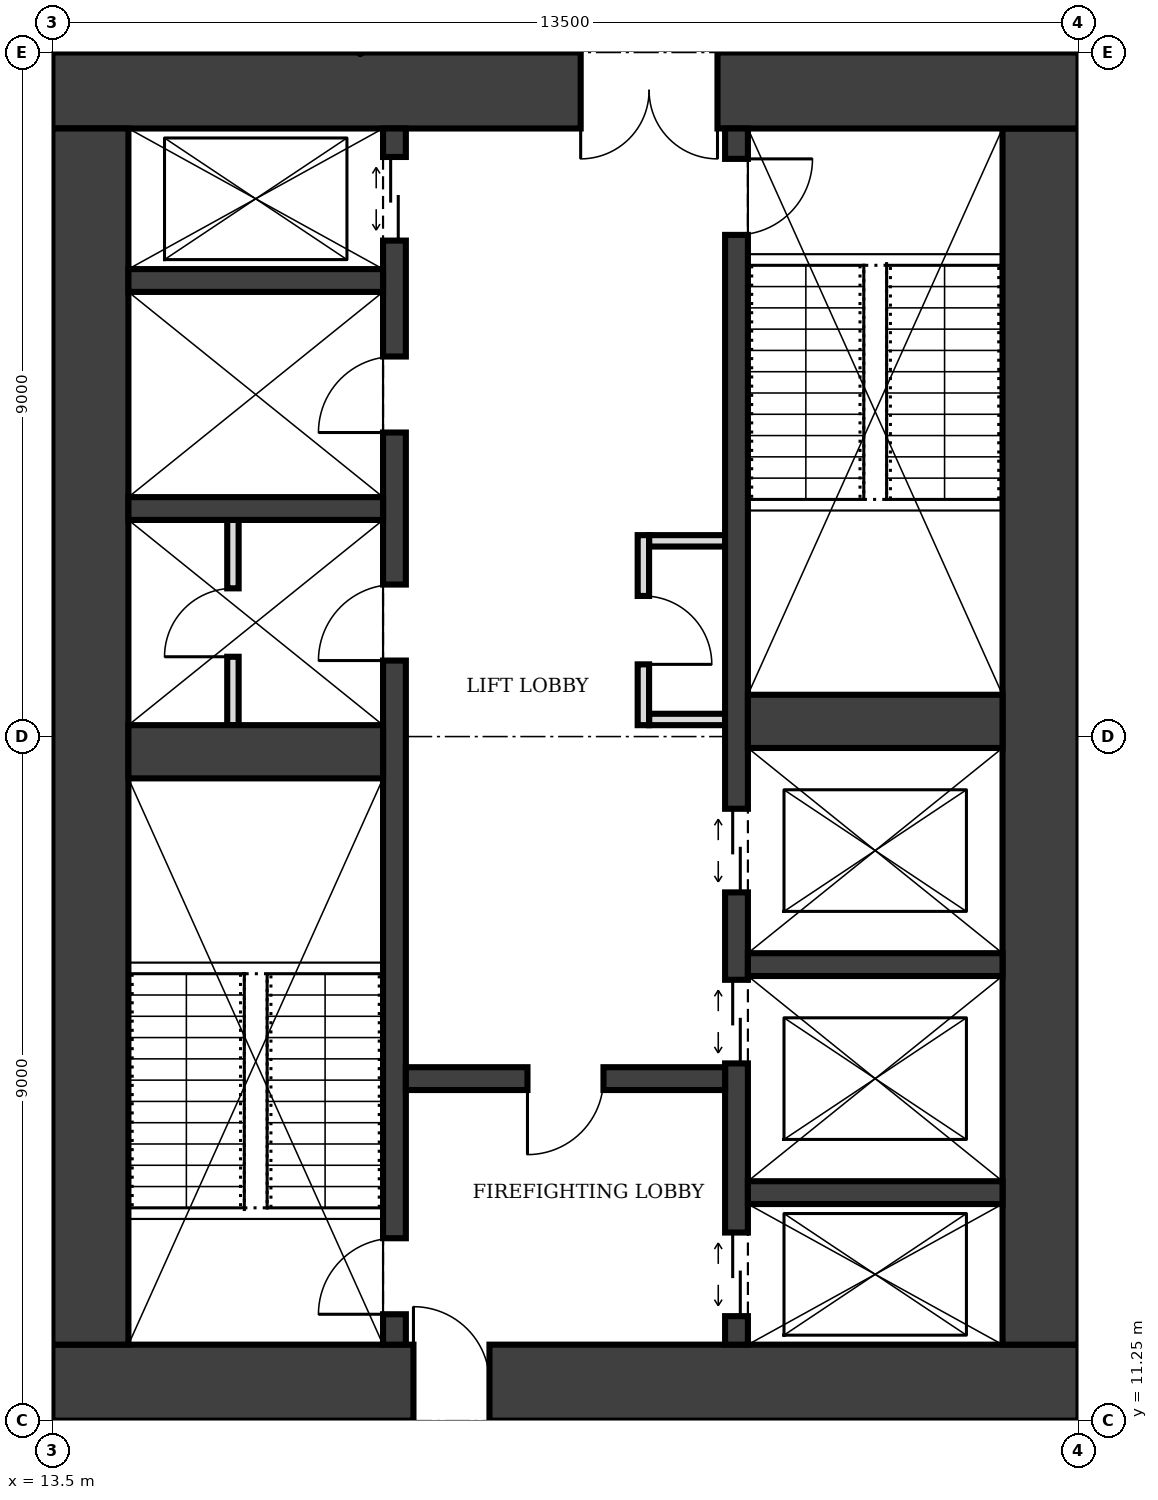
"""IFC4 building model, lengths in metres.
Left out: names, types, materials, properties, quantities, classifications, styles, units other than length and angle.
Written with IfcOpenShell. Run it as: python <this file> out.ifc"""

import sys

from ifc_helpers import new_model, si_unit, direction, frame, frame_2d, origin, place, context, subcontext, project, spatial, rectangle, extrude, element, fill, save


model = new_model("IFC4")
c1 = context("Model", 3, precision=1e-05, world=origin(), true_north=direction((0.0, 1.0)))
c2 = subcontext(c1, "Body", "Model", "MODEL_VIEW")
j1 = project(units=[si_unit("LENGTHUNIT", "METRE"), si_unit("PLANEANGLEUNIT", "RADIAN")], contexts=[c1])
p1 = place(None, origin())
s1 = spatial("IfcSite", under=j1, at=p1, CompositionType="ELEMENT")
p2 = place(p1, origin())
s2 = spatial("IfcBuilding", under=s1, at=p2, CompositionType="ELEMENT")
p3 = place(p2, frame((0.0, 0.0, 241.0)))
s3 = spatial("IfcBuildingStorey", under=s2, at=p3, CompositionType="ELEMENT", Elevation=241.0)
p4 = place(p3, frame((13.5, 11.75, 0.0), z_axis=(0.0, 0.0, 1.0), x_axis=(1.0, 0.0, 0.0)))
e1 = element("IfcWall", 1, at=p4, inside=s3, PredefinedType="SHEAR", context=c2, shape_type="SweptSolid", body=[
    extrude(rectangle(XDim=13.5, YDim=1.0, at=frame_2d((6.75, 0.0))), origin(), (0.0, 0.0, 1.0), 4.0),
])
p5 = place(p4, frame((4.75, 0.0, 0.0)))
e2 = element("IfcOpeningElement", 2, at=p5, cuts=e1, PredefinedType="OPENING", context=c2, shape_type="SweptSolid", body=[
    extrude(rectangle(XDim=1.0, YDim=2.1, at=frame_2d((0.5, 1.05))), frame((0.0, 0.51, 0.0), z_axis=(0.0, -1.0, 0.0), x_axis=(1.0, 0.0, 0.0)), (0.0, 0.0, 1.0), 1.02),
])
p6 = place(p3, frame((26.5, 12.25, 0.0), z_axis=(0.0, 0.0, 1.0), x_axis=(0.0, 1.0, 0.0)))
e3 = element("IfcWall", 3, at=p6, inside=s3, PredefinedType="SHEAR", context=c2, shape_type="SweptSolid", body=[
    extrude(rectangle(XDim=16.0, YDim=1.0, at=frame_2d((8.0, 0.0))), origin(), (0.0, 0.0, 1.0), 4.0),
])
p7 = place(p3, frame((27.0, 28.75, 0.0), z_axis=(0.0, 0.0, 1.0), x_axis=(-1.0, 0.0, 0.0)))
e4 = element("IfcWall", 4, at=p7, inside=s3, PredefinedType="SHEAR", context=c2, shape_type="SweptSolid", body=[
    extrude(rectangle(XDim=13.5, YDim=1.0, at=frame_2d((6.75, 0.0))), origin(), (0.0, 0.0, 1.0), 4.0),
])
p8 = place(p7, frame((4.75, 0.0, 0.0)))
e5 = element("IfcOpeningElement", 5, at=p8, cuts=e4, PredefinedType="OPENING", context=c2, shape_type="SweptSolid", body=[
    extrude(rectangle(XDim=1.8, YDim=2.1, at=frame_2d((0.9, 1.05))), frame((0.0, 0.51, 0.0), z_axis=(0.0, -1.0, 0.0), x_axis=(1.0, 0.0, 0.0)), (0.0, 0.0, 1.0), 1.02),
])
p9 = place(p3, frame((14.0, 28.25, 0.0), z_axis=(0.0, 0.0, 1.0), x_axis=(0.0, -1.0, 0.0)))
e6 = element("IfcWall", 6, at=p9, inside=s3, PredefinedType="SHEAR", context=c2, shape_type="SweptSolid", body=[
    extrude(rectangle(XDim=16.0, YDim=1.0, at=frame_2d((8.0, 0.0))), origin(), (0.0, 0.0, 1.0), 4.0),
])
p10 = place(p3, frame((18.0, 12.25, 0.0), z_axis=(0.0, 0.0, 1.0), x_axis=(0.0, 1.0, 0.0)))
e7 = element("IfcWall", 7, at=p10, inside=s3, PredefinedType="SHEAR", context=c2, shape_type="SweptSolid", body=[
    extrude(rectangle(XDim=16.0, YDim=0.3, at=frame_2d((8.0, 0.0))), origin(), (0.0, 0.0, 1.0), 4.0),
])
p11 = place(p10, frame((0.4, 0.0, 0.0)))
e8 = element("IfcOpeningElement", 8, at=p11, cuts=e7, PredefinedType="OPENING", context=c2, shape_type="SweptSolid", body=[
    extrude(rectangle(XDim=1.0, YDim=2.1, at=frame_2d((0.5, 1.05))), frame((0.0, 0.16, 0.0), z_axis=(0.0, -1.0, 0.0), x_axis=(1.0, 0.0, 0.0)), (0.0, 0.0, 1.0), 0.32),
])
p12 = place(p10, frame((14.525, 0.0, 0.0)))
e9 = element("IfcOpeningElement", 9, at=p12, cuts=e7, PredefinedType="OPENING", context=c2, shape_type="SweptSolid", body=[
    extrude(rectangle(XDim=1.1, YDim=2.1, at=frame_2d((0.55, 1.05))), frame((0.0, 0.16, 0.0), z_axis=(0.0, -1.0, 0.0), x_axis=(1.0, 0.0, 0.0)), (0.0, 0.0, 1.0), 0.32),
])
p13 = place(p10, frame((9.0, 0.0, 0.0)))
e10 = element("IfcOpeningElement", 10, at=p13, cuts=e7, PredefinedType="OPENING", context=c2, shape_type="SweptSolid", body=[
    extrude(rectangle(XDim=1.0, YDim=2.1, at=frame_2d((0.5, 1.05))), frame((0.0, 0.16, 0.0), z_axis=(0.0, -1.0, 0.0), x_axis=(1.0, 0.0, 0.0)), (0.0, 0.0, 1.0), 0.32),
])
p14 = place(p10, frame((12.0, 0.0, 0.0)))
e11 = element("IfcOpeningElement", 11, at=p14, cuts=e7, PredefinedType="OPENING", context=c2, shape_type="SweptSolid", body=[
    extrude(rectangle(XDim=1.0, YDim=2.1, at=frame_2d((0.5, 1.05))), frame((0.0, 0.16, 0.0), z_axis=(0.0, -1.0, 0.0), x_axis=(1.0, 0.0, 0.0)), (0.0, 0.0, 1.0), 0.32),
])
p15 = place(p3, frame((22.5, 12.25, 0.0), z_axis=(0.0, 0.0, 1.0), x_axis=(0.0, 1.0, 0.0)))
e12 = element("IfcWall", 12, at=p15, inside=s3, PredefinedType="SHEAR", context=c2, shape_type="SweptSolid", body=[
    extrude(rectangle(XDim=16.0, YDim=0.3, at=frame_2d((8.0, 0.0))), origin(), (0.0, 0.0, 1.0), 4.0),
])
p16 = place(p15, frame((14.6, 0.0, 0.0)))
e13 = element("IfcOpeningElement", 13, at=p16, cuts=e12, PredefinedType="OPENING", context=c2, shape_type="SweptSolid", body=[
    extrude(rectangle(XDim=1.0, YDim=2.1, at=frame_2d((0.5, 1.05))), frame((0.0, 0.16, 0.0), z_axis=(0.0, -1.0, 0.0), x_axis=(1.0, 0.0, 0.0)), (0.0, 0.0, 1.0), 0.32),
])
p17 = place(p15, frame((0.375, 0.0, 0.0)))
e14 = element("IfcOpeningElement", 14, at=p17, cuts=e12, PredefinedType="OPENING", context=c2, shape_type="SweptSolid", body=[
    extrude(rectangle(XDim=1.1, YDim=2.1, at=frame_2d((0.55, 1.05))), frame((0.0, 0.16, 0.0), z_axis=(0.0, -1.0, 0.0), x_axis=(1.0, 0.0, 0.0)), (0.0, 0.0, 1.0), 0.32),
])
p18 = place(p15, frame((3.7, 0.0, 0.0)))
e15 = element("IfcOpeningElement", 15, at=p18, cuts=e12, PredefinedType="OPENING", context=c2, shape_type="SweptSolid", body=[
    extrude(rectangle(XDim=1.1, YDim=2.1, at=frame_2d((0.55, 1.05))), frame((0.0, 0.16, 0.0), z_axis=(0.0, -1.0, 0.0), x_axis=(1.0, 0.0, 0.0)), (0.0, 0.0, 1.0), 0.32),
])
p19 = place(p15, frame((5.95, 0.0, 0.0)))
e16 = element("IfcOpeningElement", 16, at=p19, cuts=e12, PredefinedType="OPENING", context=c2, shape_type="SweptSolid", body=[
    extrude(rectangle(XDim=1.1, YDim=2.1, at=frame_2d((0.55, 1.05))), frame((0.0, 0.16, 0.0), z_axis=(0.0, -1.0, 0.0), x_axis=(1.0, 0.0, 0.0)), (0.0, 0.0, 1.0), 0.32),
])
p20 = place(p3, frame((14.5, 20.05, 0.0), z_axis=(0.0, 0.0, 1.0), x_axis=(1.0, 0.0, 0.0)))
e17 = element("IfcWall", 17, at=p20, inside=s3, PredefinedType="SHEAR", context=c2, shape_type="SweptSolid", body=[
    extrude(rectangle(XDim=3.35, YDim=0.7, at=frame_2d((1.675, 0.0))), origin(), (0.0, 0.0, 1.0), 4.0),
])
p21 = place(p3, frame((18.15, 15.75, 0.0), z_axis=(0.0, 0.0, 1.0), x_axis=(1.0, 0.0, 0.0)))
e18 = element("IfcWall", 18, at=p21, inside=s3, PredefinedType="SHEAR", context=c2, shape_type="SweptSolid", body=[
    extrude(rectangle(XDim=4.2, YDim=0.3, at=frame_2d((2.1, 0.0))), origin(), (0.0, 0.0, 1.0), 4.0),
])
p22 = place(p21, frame((1.6, 0.0, 0.0)))
e19 = element("IfcOpeningElement", 19, at=p22, cuts=e18, PredefinedType="OPENING", context=c2, shape_type="SweptSolid", body=[
    extrude(rectangle(XDim=1.0, YDim=2.1, at=frame_2d((0.5, 1.05))), frame((0.0, 0.16, 0.0), z_axis=(0.0, -1.0, 0.0), x_axis=(1.0, 0.0, 0.0)), (0.0, 0.0, 1.0), 0.32),
])
for number, where, z_axis, x_axis in (
    (20, (22.65, 14.25, 0.0), (0.0, 0.0, 1.0), (1.0, 0.0, 0.0)),
    (21, (22.65, 17.25, 0.0), (0.0, 0.0, 1.0), (1.0, 0.0, 0.0)),
):
    element("IfcWall", number, at=place(p3, frame(where, z_axis=z_axis, x_axis=x_axis)), inside=s3, PredefinedType="SHEAR", context=c2, shape_type="SweptSolid", body=[
        extrude(rectangle(XDim=3.35, YDim=0.3, at=frame_2d((1.675, 0.0))), origin(), (0.0, 0.0, 1.0), 4.0),
    ])
p23 = place(p3, frame((22.65, 20.45, 0.0), z_axis=(0.0, 0.0, 1.0), x_axis=(1.0, 0.0, 0.0)))
e22 = element("IfcWall", 22, at=p23, inside=s3, PredefinedType="SHEAR", context=c2, shape_type="SweptSolid", body=[
    extrude(rectangle(XDim=3.35, YDim=0.7, at=frame_2d((1.675, 0.0))), origin(), (0.0, 0.0, 1.0), 4.0),
])
for number, where, z_axis, x_axis in (
    (23, (14.5, 23.25, 0.0), (0.0, 0.0, 1.0), (1.0, 0.0, 0.0)),
    (24, (14.5, 26.25, 0.0), (0.0, 0.0, 1.0), (1.0, 0.0, 0.0)),
):
    element("IfcWall", number, at=place(p3, frame(where, z_axis=z_axis, x_axis=x_axis)), inside=s3, PredefinedType="SHEAR", context=c2, shape_type="SweptSolid", body=[
        extrude(rectangle(XDim=3.35, YDim=0.3, at=frame_2d((1.675, 0.0))), origin(), (0.0, 0.0, 1.0), 4.0),
    ])
p24 = place(p3, frame((21.275, 20.4, 0.0), z_axis=(0.0, 0.0, 1.0), x_axis=(0.0, 1.0, 0.0)))
e25 = element("IfcWall", 25, at=p24, inside=s3, PredefinedType="PARTITIONING", context=c2, shape_type="SweptSolid", body=[
    extrude(rectangle(XDim=2.5, YDim=0.15, at=frame_2d((1.25, 0.0))), origin(), (0.0, 0.0, 1.0), 3.75),
])
p25 = place(p24, frame((0.8, 0.0, 0.0)))
e26 = element("IfcOpeningElement", 26, at=p25, cuts=e25, PredefinedType="OPENING", context=c2, shape_type="SweptSolid", body=[
    extrude(rectangle(XDim=0.9, YDim=2.1, at=frame_2d((0.45, 1.05))), frame((0.0, 0.085, 0.0), z_axis=(0.0, -1.0, 0.0), x_axis=(1.0, 0.0, 0.0)), (0.0, 0.0, 1.0), 0.17),
])
for number, where, z_axis, x_axis in (
    (27, (21.35, 20.475, 0.0), (0.0, 0.0, 1.0), (1.0, 0.0, 0.0)),
    (28, (21.35, 22.825, 0.0), (0.0, 0.0, 1.0), (1.0, 0.0, 0.0)),
):
    element("IfcWall", number, at=place(p3, frame(where, z_axis=z_axis, x_axis=x_axis)), inside=s3, PredefinedType="PARTITIONING", context=c2, shape_type="SweptSolid", body=[
        extrude(rectangle(XDim=1.0, YDim=0.15, at=frame_2d((0.5, 0.0))), origin(), (0.0, 0.0, 1.0), 3.75),
    ])
p26 = place(p3, frame((15.875, 20.4, 0.0), z_axis=(0.0, 0.0, 1.0), x_axis=(0.0, 1.0, 0.0)))
e29 = element("IfcWall", 29, at=p26, inside=s3, PredefinedType="PARTITIONING", context=c2, shape_type="SweptSolid", body=[
    extrude(rectangle(XDim=2.7, YDim=0.15, at=frame_2d((1.35, 0.0))), origin(), (0.0, 0.0, 1.0), 3.75),
])
p27 = place(p26, frame((0.9, 0.0, 0.0)))
e30 = element("IfcOpeningElement", 30, at=p27, cuts=e29, PredefinedType="OPENING", context=c2, shape_type="SweptSolid", body=[
    extrude(rectangle(XDim=0.9, YDim=2.1, at=frame_2d((0.45, 1.05))), frame((0.0, 0.085, 0.0), z_axis=(0.0, -1.0, 0.0), x_axis=(1.0, 0.0, 0.0)), (0.0, 0.0, 1.0), 0.17),
])
p28 = place(p5, origin())
e31 = element("IfcDoor", 31, at=p28, inside=s3, OperationType="SINGLE_SWING_LEFT", PredefinedType="DOOR", context=c2, shape_type="SweptSolid", body=[
    extrude(rectangle(XDim=1.0, YDim=2.1, at=frame_2d((0.5, 1.05))), frame((0.0, 0.025, 0.0), z_axis=(0.0, -1.0, 0.0), x_axis=(1.0, 0.0, 0.0)), (0.0, 0.0, 1.0), 0.05),
])
fill(e2, e31)
p29 = place(p8, origin())
e32 = element("IfcDoor", 32, at=p29, inside=s3, OperationType="DOUBLE_DOOR_SINGLE_SWING", PredefinedType="DOOR", context=c2, shape_type="SweptSolid", body=[
    extrude(rectangle(XDim=1.8, YDim=2.1, at=frame_2d((0.9, 1.05))), frame((0.0, 0.025, 0.0), z_axis=(0.0, -1.0, 0.0), x_axis=(1.0, 0.0, 0.0)), (0.0, 0.0, 1.0), 0.05),
])
fill(e5, e32)
p30 = place(p22, frame((1.0, 0.0, 0.0), z_axis=(0.0, 0.0, 1.0), x_axis=(-1.0, 0.0, 0.0)))
e33 = element("IfcDoor", 33, at=p30, inside=s3, OperationType="SINGLE_SWING_RIGHT", PredefinedType="DOOR", context=c2, shape_type="SweptSolid", body=[
    extrude(rectangle(XDim=1.0, YDim=2.1, at=frame_2d((0.5, 1.05))), frame((0.0, 0.025, 0.0), z_axis=(0.0, -1.0, 0.0), x_axis=(1.0, 0.0, 0.0)), (0.0, 0.0, 1.0), 0.05),
])
fill(e19, e33)
p31 = place(p11, origin())
e34 = element("IfcDoor", 34, at=p31, inside=s3, OperationType="SINGLE_SWING_LEFT", PredefinedType="DOOR", context=c2, shape_type="SweptSolid", body=[
    extrude(rectangle(XDim=1.0, YDim=2.1, at=frame_2d((0.5, 1.05))), frame((0.0, 0.025, 0.0), z_axis=(0.0, -1.0, 0.0), x_axis=(1.0, 0.0, 0.0)), (0.0, 0.0, 1.0), 0.05),
])
fill(e8, e34)
p32 = place(p16, frame((1.0, 0.0, 0.0), z_axis=(0.0, 0.0, 1.0), x_axis=(-1.0, 0.0, 0.0)))
e35 = element("IfcDoor", 35, at=p32, inside=s3, OperationType="SINGLE_SWING_LEFT", PredefinedType="DOOR", context=c2, shape_type="SweptSolid", body=[
    extrude(rectangle(XDim=1.0, YDim=2.1, at=frame_2d((0.5, 1.05))), frame((0.0, 0.025, 0.0), z_axis=(0.0, -1.0, 0.0), x_axis=(1.0, 0.0, 0.0)), (0.0, 0.0, 1.0), 0.05),
])
fill(e13, e35)
p33 = place(p17, origin())
e36 = element("IfcDoor", 36, at=p33, inside=s3, OperationType="DOUBLE_DOOR_SLIDING", PredefinedType="DOOR", context=c2, shape_type="SweptSolid", body=[
    extrude(rectangle(XDim=1.1, YDim=2.1, at=frame_2d((0.55, 1.05))), frame((0.0, 0.025, 0.0), z_axis=(0.0, -1.0, 0.0), x_axis=(1.0, 0.0, 0.0)), (0.0, 0.0, 1.0), 0.05),
])
fill(e14, e36)
p34 = place(p12, origin())
e37 = element("IfcDoor", 37, at=p34, inside=s3, OperationType="DOUBLE_DOOR_SLIDING", PredefinedType="DOOR", context=c2, shape_type="SweptSolid", body=[
    extrude(rectangle(XDim=1.1, YDim=2.1, at=frame_2d((0.55, 1.05))), frame((0.0, 0.025, 0.0), z_axis=(0.0, -1.0, 0.0), x_axis=(1.0, 0.0, 0.0)), (0.0, 0.0, 1.0), 0.05),
])
fill(e9, e37)
p35 = place(p18, origin())
e38 = element("IfcDoor", 38, at=p35, inside=s3, OperationType="DOUBLE_DOOR_SLIDING", PredefinedType="DOOR", context=c2, shape_type="SweptSolid", body=[
    extrude(rectangle(XDim=1.1, YDim=2.1, at=frame_2d((0.55, 1.05))), frame((0.0, 0.025, 0.0), z_axis=(0.0, -1.0, 0.0), x_axis=(1.0, 0.0, 0.0)), (0.0, 0.0, 1.0), 0.05),
])
fill(e15, e38)
p36 = place(p19, origin())
e39 = element("IfcDoor", 39, at=p36, inside=s3, OperationType="DOUBLE_DOOR_SLIDING", PredefinedType="DOOR", context=c2, shape_type="SweptSolid", body=[
    extrude(rectangle(XDim=1.1, YDim=2.1, at=frame_2d((0.55, 1.05))), frame((0.0, 0.025, 0.0), z_axis=(0.0, -1.0, 0.0), x_axis=(1.0, 0.0, 0.0)), (0.0, 0.0, 1.0), 0.05),
])
fill(e16, e39)
p37 = place(p25, frame((0.9, 0.0, 0.0), z_axis=(0.0, 0.0, 1.0), x_axis=(-1.0, 0.0, 0.0)))
e40 = element("IfcDoor", 40, at=p37, inside=s3, OperationType="SINGLE_SWING_RIGHT", PredefinedType="DOOR", context=c2, shape_type="SweptSolid", body=[
    extrude(rectangle(XDim=0.9, YDim=2.1, at=frame_2d((0.45, 1.05))), frame((0.0, 0.025, 0.0), z_axis=(0.0, -1.0, 0.0), x_axis=(1.0, 0.0, 0.0)), (0.0, 0.0, 1.0), 0.05),
])
fill(e26, e40)
p38 = place(p13, origin())
e41 = element("IfcDoor", 41, at=p38, inside=s3, OperationType="SINGLE_SWING_LEFT", PredefinedType="DOOR", context=c2, shape_type="SweptSolid", body=[
    extrude(rectangle(XDim=1.0, YDim=2.1, at=frame_2d((0.5, 1.05))), frame((0.0, 0.025, 0.0), z_axis=(0.0, -1.0, 0.0), x_axis=(1.0, 0.0, 0.0)), (0.0, 0.0, 1.0), 0.05),
])
fill(e10, e41)
p39 = place(p27, origin())
e42 = element("IfcDoor", 42, at=p39, inside=s3, OperationType="SINGLE_SWING_LEFT", PredefinedType="DOOR", context=c2, shape_type="SweptSolid", body=[
    extrude(rectangle(XDim=0.9, YDim=2.1, at=frame_2d((0.45, 1.05))), frame((0.0, 0.025, 0.0), z_axis=(0.0, -1.0, 0.0), x_axis=(1.0, 0.0, 0.0)), (0.0, 0.0, 1.0), 0.05),
])
fill(e30, e42)
p40 = place(p14, origin())
e43 = element("IfcDoor", 43, at=p40, inside=s3, OperationType="SINGLE_SWING_LEFT", PredefinedType="DOOR", context=c2, shape_type="SweptSolid", body=[
    extrude(rectangle(XDim=1.0, YDim=2.1, at=frame_2d((0.5, 1.05))), frame((0.0, 0.025, 0.0), z_axis=(0.0, -1.0, 0.0), x_axis=(1.0, 0.0, 0.0)), (0.0, 0.0, 1.0), 0.05),
])
fill(e11, e43)
save(model, sys.argv[1])
